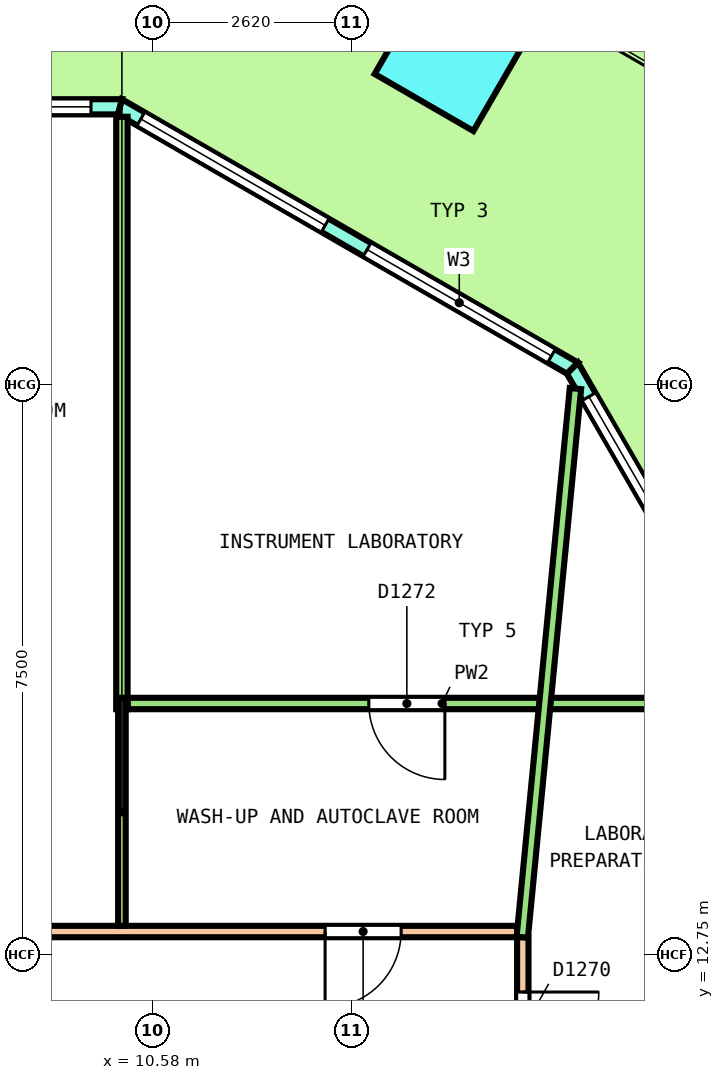
"""IFC4 building model, lengths in metres.
Left out: names, types, materials, properties, quantities, classifications, styles, units other than length and angle.
Written with IfcOpenShell. Run it as: python <this file> out.ifc"""

import sys

from ifc_helpers import new_model, si_unit, direction, frame, frame_2d, origin, origin_2d, place, context, subcontext, project, spatial, polyline, rectangle, outline, extrude, element, fill, save


model = new_model("IFC4")
c1 = context("Model", 3, precision=1e-05, world=origin(), true_north=direction((0.0, 1.0)))
c2 = subcontext(c1, "Body", "Model", "MODEL_VIEW")
j1 = project(units=[si_unit("LENGTHUNIT", "METRE"), si_unit("PLANEANGLEUNIT", "RADIAN")], contexts=[c1])
p1 = place(None, origin())
s1 = spatial("IfcSite", under=j1, at=p1, CompositionType="ELEMENT")
p2 = place(p1, origin())
s2 = spatial("IfcBuilding", under=s1, at=p2, CompositionType="ELEMENT")
p3 = place(p2, frame((0.0, 0.0, 23.4)))
s3 = spatial("IfcBuildingStorey", under=s2, at=p3, CompositionType="ELEMENT", Elevation=23.4)
p4 = place(p3, frame((14.526, 24.606, 0.0), z_axis=(0.036265236264, 0.0, 0.999342199969), x_axis=(-0.865313546461, 0.500246354177, 0.031401456084)))
e1 = element("IfcColumn", 1, at=p4, inside=s3, PredefinedType="COLUMN", context=c2, shape_type="SweptSolid", body=[
    extrude(rectangle(XDim=1.5, YDim=1.5, at=origin_2d()), origin(), (0.0, 0.0, 1.0), 4.053),
])
p5 = place(p3, frame((25.772, 3.714, 0.0), z_axis=(0.0, 0.0, 1.0), x_axis=(-0.500000373815, 0.866025187962, 0.0)))
e2 = element("IfcWall", 2, at=p5, inside=s3, PredefinedType="SOLIDWALL", context=c2, shape_type="SweptSolid", body=[
    extrude(outline(polyline([(-0.027, -0.1), (0.994, -0.1), (2.015, -0.1), (3.035, -0.1), (4.056, -0.1), (5.077, -0.1), (6.097, -0.1), (7.118, -0.1), (8.139, -0.1), (9.16, -0.1), (10.18, -0.1), (11.201, -0.1), (12.222, -0.1), (13.242, -0.1), (14.263, -0.1), (15.284, -0.1), (16.304, -0.1), (17.325, -0.1), (18.346, -0.1), (19.367, -0.1), (19.313, 0.1), (18.298, 0.1), (17.283, 0.1), (16.268, 0.1), (15.253, 0.1), (14.238, 0.1), (13.223, 0.1), (12.208, 0.1), (11.193, 0.1), (10.177, 0.1), (9.162, 0.1), (8.147, 0.1), (7.132, 0.1), (6.117, 0.1), (5.102, 0.1), (4.087, 0.1), (3.072, 0.1), (2.057, 0.1), (1.042, 0.1), (0.027, 0.1), (-0.027, -0.1)])), origin(), (0.0, 0.0, 1.0), 4.1),
])
p6 = place(p5, frame((0.434, 0.0, 0.1)))
e3 = element("IfcOpeningElement", 3, at=p6, cuts=e2, PredefinedType="OPENING", context=c2, shape_type="SweptSolid", body=[
    extrude(rectangle(XDim=3.0, YDim=2.9, at=frame_2d((1.5, 1.45))), frame((0.0, 0.11, 0.0), z_axis=(0.0, -1.0, 0.0), x_axis=(1.0, 0.0, 0.0)), (0.0, 0.0, 1.0), 0.22),
])
p7 = place(p5, frame((4.302, 0.0, 0.1)))
e4 = element("IfcOpeningElement", 4, at=p7, cuts=e2, PredefinedType="OPENING", context=c2, shape_type="SweptSolid", body=[
    extrude(rectangle(XDim=3.0, YDim=2.9, at=frame_2d((1.5, 1.45))), frame((0.0, 0.11, 0.0), z_axis=(0.0, -1.0, 0.0), x_axis=(1.0, 0.0, 0.0)), (0.0, 0.0, 1.0), 0.22),
])
p8 = place(p5, frame((8.77, 0.0, 0.0)))
e5 = element("IfcOpeningElement", 5, at=p8, cuts=e2, PredefinedType="OPENING", context=c2, shape_type="SweptSolid", body=[
    extrude(rectangle(XDim=1.8, YDim=2.4, at=frame_2d((0.9, 1.2))), frame((0.0, 0.11, 0.0), z_axis=(0.0, -1.0, 0.0), x_axis=(1.0, 0.0, 0.0)), (0.0, 0.0, 1.0), 0.22),
])
p9 = place(p5, frame((8.77, 0.0, 2.55)))
e6 = element("IfcOpeningElement", 6, at=p9, cuts=e2, PredefinedType="OPENING", context=c2, shape_type="SweptSolid", body=[
    extrude(rectangle(XDim=1.8, YDim=0.45, at=frame_2d((0.9, 0.225))), frame((0.0, 0.11, 0.0), z_axis=(0.0, -1.0, 0.0), x_axis=(1.0, 0.0, 0.0)), (0.0, 0.0, 1.0), 0.22),
])
p10 = place(p5, frame((12.038, 0.0, 0.1)))
e7 = element("IfcOpeningElement", 7, at=p10, cuts=e2, PredefinedType="OPENING", context=c2, shape_type="SweptSolid", body=[
    extrude(rectangle(XDim=3.0, YDim=2.9, at=frame_2d((1.5, 1.45))), frame((0.0, 0.11, 0.0), z_axis=(0.0, -1.0, 0.0), x_axis=(1.0, 0.0, 0.0)), (0.0, 0.0, 1.0), 0.22),
])
p11 = place(p5, frame((15.906, 0.0, 0.1)))
e8 = element("IfcOpeningElement", 8, at=p11, cuts=e2, PredefinedType="OPENING", context=c2, shape_type="SweptSolid", body=[
    extrude(rectangle(XDim=3.0, YDim=2.9, at=frame_2d((1.5, 1.45))), frame((0.0, 0.11, 0.0), z_axis=(0.0, -1.0, 0.0), x_axis=(1.0, 0.0, 0.0)), (0.0, 0.0, 1.0), 0.22),
])
p12 = place(p3, frame((16.103, 20.463, 0.0), z_axis=(0.0, 0.0, 1.0), x_axis=(-0.866029458321, 0.49999297727, 0.0)))
e9 = element("IfcWall", 9, at=p12, inside=s3, PredefinedType="SOLIDWALL", context=c2, shape_type="SweptSolid", body=[
    extrude(outline(polyline([(-0.027, -0.1), (1.128, -0.1), (2.282, -0.1), (3.437, -0.1), (4.592, -0.1), (5.747, -0.1), (6.901, -0.1), (6.848, 0.1), (5.711, 0.1), (4.574, 0.1), (3.437, 0.1), (2.301, 0.1), (1.164, 0.1), (0.027, 0.1), (-0.027, -0.1)])), origin(), (0.0, 0.0, 1.0), 4.1),
])
p13 = place(p12, frame((0.319, 0.0, 0.1)))
e10 = element("IfcOpeningElement", 10, at=p13, cuts=e9, PredefinedType="OPENING", context=c2, shape_type="SweptSolid", body=[
    extrude(rectangle(XDim=2.8, YDim=2.9, at=frame_2d((1.4, 1.45))), frame((0.0, 0.11, 0.0), z_axis=(0.0, -1.0, 0.0), x_axis=(1.0, 0.0, 0.0)), (0.0, 0.0, 1.0), 0.22),
])
p14 = place(p12, frame((3.756, 0.0, 0.1)))
e11 = element("IfcOpeningElement", 11, at=p14, cuts=e9, PredefinedType="OPENING", context=c2, shape_type="SweptSolid", body=[
    extrude(rectangle(XDim=2.8, YDim=2.9, at=frame_2d((1.4, 1.45))), frame((0.0, 0.11, 0.0), z_axis=(0.0, -1.0, 0.0), x_axis=(1.0, 0.0, 0.0)), (0.0, 0.0, 1.0), 0.22),
])
p15 = place(p3, frame((10.149, 23.9, 0.0), z_axis=(0.0, 0.0, 1.0), x_axis=(-1.0, 0.0, 0.0)))
e12 = element("IfcWall", 12, at=p15, inside=s3, PredefinedType="SOLIDWALL", context=c2, shape_type="SweptSolid", body=[
    extrude(outline(polyline([(-0.027, -0.1), (0.991, -0.1), (2.008, -0.1), (3.026, -0.1), (4.043, -0.1), (5.061, -0.1), (6.079, -0.1), (7.096, -0.1), (8.114, -0.1), (9.131, -0.1), (10.149, -0.1), (11.167, -0.1), (12.184, -0.1), (13.202, -0.1), (14.219, -0.1), (15.237, -0.1), (16.254, -0.1), (17.272, -0.1), (18.29, -0.1), (19.307, -0.1), (20.325, -0.1), (20.271, 0.1), (19.259, 0.1), (18.247, 0.1), (17.234, 0.1), (16.222, 0.1), (15.21, 0.1), (14.198, 0.1), (13.186, 0.1), (12.173, 0.1), (11.161, 0.1), (10.149, 0.1), (9.137, 0.1), (8.125, 0.1), (7.112, 0.1), (6.1, 0.1), (5.088, 0.1), (4.076, 0.1), (3.063, 0.1), (2.051, 0.1), (1.039, 0.1), (0.027, 0.1), (-0.027, -0.1)])), origin(), (0.0, 0.0, 1.0), 4.1),
])
p16 = place(p15, frame((0.38, 0.0, 0.1)))
e13 = element("IfcOpeningElement", 13, at=p16, cuts=e12, PredefinedType="OPENING", context=c2, shape_type="SweptSolid", body=[
    extrude(rectangle(XDim=3.3, YDim=2.9, at=frame_2d((1.65, 1.45))), frame((0.0, 0.11, 0.0), z_axis=(0.0, -1.0, 0.0), x_axis=(1.0, 0.0, 0.0)), (0.0, 0.0, 1.0), 0.22),
])
p17 = place(p15, frame((4.439, 0.0, 0.1)))
e14 = element("IfcOpeningElement", 14, at=p17, cuts=e12, PredefinedType="OPENING", context=c2, shape_type="SweptSolid", body=[
    extrude(rectangle(XDim=3.3, YDim=2.9, at=frame_2d((1.65, 1.45))), frame((0.0, 0.11, 0.0), z_axis=(0.0, -1.0, 0.0), x_axis=(1.0, 0.0, 0.0)), (0.0, 0.0, 1.0), 0.22),
])
p18 = place(p15, frame((9.249, 0.0, 0.0)))
e15 = element("IfcOpeningElement", 15, at=p18, cuts=e12, PredefinedType="OPENING", context=c2, shape_type="SweptSolid", body=[
    extrude(rectangle(XDim=1.8, YDim=2.4, at=frame_2d((0.9, 1.2))), frame((0.0, 0.11, 0.0), z_axis=(0.0, -1.0, 0.0), x_axis=(1.0, 0.0, 0.0)), (0.0, 0.0, 1.0), 0.22),
])
p19 = place(p15, frame((9.249, 0.0, 2.55)))
e16 = element("IfcOpeningElement", 16, at=p19, cuts=e12, PredefinedType="OPENING", context=c2, shape_type="SweptSolid", body=[
    extrude(rectangle(XDim=1.8, YDim=0.45, at=frame_2d((0.9, 0.225))), frame((0.0, 0.11, 0.0), z_axis=(0.0, -1.0, 0.0), x_axis=(1.0, 0.0, 0.0)), (0.0, 0.0, 1.0), 0.22),
])
p20 = place(p15, frame((12.559, 0.0, 0.1)))
e17 = element("IfcOpeningElement", 17, at=p20, cuts=e12, PredefinedType="OPENING", context=c2, shape_type="SweptSolid", body=[
    extrude(rectangle(XDim=3.3, YDim=2.9, at=frame_2d((1.65, 1.45))), frame((0.0, 0.11, 0.0), z_axis=(0.0, -1.0, 0.0), x_axis=(1.0, 0.0, 0.0)), (0.0, 0.0, 1.0), 0.22),
])
p21 = place(p15, frame((16.618, 0.0, 0.1)))
e18 = element("IfcOpeningElement", 18, at=p21, cuts=e12, PredefinedType="OPENING", context=c2, shape_type="SweptSolid", body=[
    extrude(rectangle(XDim=3.3, YDim=2.9, at=frame_2d((1.65, 1.45))), frame((0.0, 0.11, 0.0), z_axis=(0.0, -1.0, 0.0), x_axis=(1.0, 0.0, 0.0)), (0.0, 0.0, 1.0), 0.22),
])
p22 = place(p3, frame((15.45, -12.975, 0.0), z_axis=(0.0, 0.0, 1.0), x_axis=(0.0, 1.0, 0.0)))
e19 = element("IfcWall", 19, at=p22, inside=s3, PredefinedType="PARTITIONING", context=c2, shape_type="SweptSolid", body=[
    extrude(rectangle(XDim=25.95, YDim=0.15, at=frame_2d((12.975, 0.0))), origin(), (0.0, 0.0, 1.0), 3.05),
])
p23 = place(p22, frame((13.124, 0.0, 0.0)))
e20 = element("IfcOpeningElement", 20, at=p23, cuts=e19, PredefinedType="OPENING", context=c2, shape_type="SweptSolid", body=[
    extrude(rectangle(XDim=1.0, YDim=2.1, at=frame_2d((0.5, 1.05))), frame((0.0, 0.085, 0.0), z_axis=(0.0, -1.0, 0.0), x_axis=(1.0, 0.0, 0.0)), (0.0, 0.0, 1.0), 0.17),
])
p24 = place(p22, frame((24.229, 0.0, 0.0)))
e21 = element("IfcOpeningElement", 21, at=p24, cuts=e19, PredefinedType="OPENING", context=c2, shape_type="SweptSolid", body=[
    extrude(rectangle(XDim=1.0, YDim=2.1, at=frame_2d((0.5, 1.05))), frame((0.0, 0.085, 0.0), z_axis=(0.0, -1.0, 0.0), x_axis=(1.0, 0.0, 0.0)), (0.0, 0.0, 1.0), 0.17),
])
p25 = place(p22, frame((3.132, 0.0, 0.0)))
e22 = element("IfcOpeningElement", 22, at=p25, cuts=e19, PredefinedType="OPENING", context=c2, shape_type="SweptSolid", body=[
    extrude(rectangle(XDim=1.0, YDim=2.1, at=frame_2d((0.5, 1.05))), frame((0.0, 0.085, 0.0), z_axis=(0.0, -1.0, 0.0), x_axis=(1.0, 0.0, 0.0)), (0.0, 0.0, 1.0), 0.17),
])
p26 = place(p3, frame((-15.375, 13.05, 0.0), z_axis=(0.0, 0.0, 1.0), x_axis=(1.0, 0.0, 0.0)))
e23 = element("IfcWall", 23, at=p26, inside=s3, PredefinedType="PARTITIONING", context=c2, shape_type="SweptSolid", body=[
    extrude(rectangle(XDim=30.75, YDim=0.15, at=frame_2d((15.375, 0.0))), origin(), (0.0, 0.0, 1.0), 3.05),
])
p27 = place(p26, frame((28.224, 0.0, 0.0)))
e24 = element("IfcOpeningElement", 24, at=p27, cuts=e23, PredefinedType="OPENING", context=c2, shape_type="SweptSolid", body=[
    extrude(rectangle(XDim=1.0, YDim=2.1, at=frame_2d((0.5, 1.05))), frame((0.0, 0.085, 0.0), z_axis=(0.0, -1.0, 0.0), x_axis=(1.0, 0.0, 0.0)), (0.0, 0.0, 1.0), 0.17),
])
p28 = place(p26, frame((23.241, 0.0, 0.0)))
e25 = element("IfcOpeningElement", 25, at=p28, cuts=e23, PredefinedType="OPENING", context=c2, shape_type="SweptSolid", body=[
    extrude(rectangle(XDim=1.2, YDim=2.1, at=frame_2d((0.6, 1.05))), frame((0.0, 0.085, 0.0), z_axis=(0.0, -1.0, 0.0), x_axis=(1.0, 0.0, 0.0)), (0.0, 0.0, 1.0), 0.17),
])
p29 = place(p26, frame((17.746, 0.0, 0.0)))
e26 = element("IfcOpeningElement", 26, at=p29, cuts=e23, PredefinedType="OPENING", context=c2, shape_type="SweptSolid", body=[
    extrude(rectangle(XDim=1.2, YDim=2.1, at=frame_2d((0.6, 1.05))), frame((0.0, 0.085, 0.0), z_axis=(0.0, -1.0, 0.0), x_axis=(1.0, 0.0, 0.0)), (0.0, 0.0, 1.0), 0.17),
])
p30 = place(p26, frame((11.247, 0.0, 0.0)))
e27 = element("IfcOpeningElement", 27, at=p30, cuts=e23, PredefinedType="OPENING", context=c2, shape_type="SweptSolid", body=[
    extrude(rectangle(XDim=1.2, YDim=2.1, at=frame_2d((0.6, 1.05))), frame((0.0, 0.085, 0.0), z_axis=(0.0, -1.0, 0.0), x_axis=(1.0, 0.0, 0.0)), (0.0, 0.0, 1.0), 0.17),
])
p31 = place(p26, frame((6.577, 0.0, 0.0)))
e28 = element("IfcOpeningElement", 28, at=p31, cuts=e23, PredefinedType="OPENING", context=c2, shape_type="SweptSolid", body=[
    extrude(rectangle(XDim=1.0, YDim=2.1, at=frame_2d((0.5, 1.05))), frame((0.0, 0.085, 0.0), z_axis=(0.0, -1.0, 0.0), x_axis=(1.0, 0.0, 0.0)), (0.0, 0.0, 1.0), 0.17),
])
p32 = place(p26, frame((0.562, 0.0, 0.0)))
e29 = element("IfcOpeningElement", 29, at=p32, cuts=e23, PredefinedType="OPENING", context=c2, shape_type="SweptSolid", body=[
    extrude(rectangle(XDim=1.0, YDim=2.1, at=frame_2d((0.5, 1.05))), frame((0.0, 0.085, 0.0), z_axis=(0.0, -1.0, 0.0), x_axis=(1.0, 0.0, 0.0)), (0.0, 0.0, 1.0), 0.17),
])
p33 = place(p3, frame((10.251, 16.05, 0.0), z_axis=(0.0, 0.0, 1.0), x_axis=(1.0, 0.0, 0.0)))
e30 = element("IfcWall", 30, at=p33, inside=s3, PredefinedType="PARTITIONING", context=c2, shape_type="SweptSolid", body=[
    extrude(rectangle(XDim=8.274, YDim=0.15, at=frame_2d((4.137, 0.0))), origin(), (0.0, 0.0, 1.0), 3.05),
])
p34 = place(p33, frame((3.174, 0.0, 0.0)))
e31 = element("IfcOpeningElement", 31, at=p34, cuts=e30, PredefinedType="OPENING", context=c2, shape_type="SweptSolid", body=[
    extrude(rectangle(XDim=1.0, YDim=2.1, at=frame_2d((0.5, 1.05))), frame((0.0, 0.085, 0.0), z_axis=(0.0, -1.0, 0.0), x_axis=(1.0, 0.0, 0.0)), (0.0, 0.0, 1.0), 0.17),
])
p35 = place(p3, frame((15.443, 12.975, 0.0), z_axis=(0.0, 0.0, 1.0), x_axis=(0.096486657892, 0.995334277943, 0.0)))
e32 = element("IfcWall", 32, at=p35, inside=s3, PredefinedType="PARTITIONING", context=c2, shape_type="SweptSolid", body=[
    extrude(rectangle(XDim=7.252, YDim=0.15, at=frame_2d((3.626, 0.0))), origin(), (0.0, 0.0, 1.0), 3.05),
])
p36 = place(p3, frame((10.176, 15.975, 0.0), z_axis=(0.0, 0.0, 1.0), x_axis=(0.0, 1.0, 0.0)))
e33 = element("IfcWall", 33, at=p36, inside=s3, PredefinedType="PARTITIONING", context=c2, shape_type="SweptSolid", body=[
    extrude(rectangle(XDim=7.794, YDim=0.15, at=frame_2d((3.897, 0.0))), origin(), (0.0, 0.0, 1.0), 3.05),
])
p37 = place(p3, frame((10.176, 13.125, 0.0), z_axis=(0.0, 0.0, 1.0), x_axis=(0.0, 1.0, 0.0)))
e34 = element("IfcWall", 34, at=p37, inside=s3, PredefinedType="PARTITIONING", context=c2, shape_type="SweptSolid", body=[
    extrude(rectangle(XDim=3.0, YDim=0.1, at=frame_2d((1.5, 0.0))), origin(), (0.0, 0.0, 1.0), 4.1),
])
p38 = place(p11, origin())
e35 = element("IfcWindow", 35, at=p38, inside=s3, PartitioningType="SINGLE_PANEL", PredefinedType="WINDOW", context=c2, shape_type="SweptSolid", body=[
    extrude(rectangle(XDim=3.0, YDim=2.9, at=frame_2d((1.5, 1.45))), frame((0.0, 0.03, 0.0), z_axis=(0.0, -1.0, 0.0), x_axis=(1.0, 0.0, 0.0)), (0.0, 0.0, 1.0), 0.06),
])
fill(e8, e35)
p39 = place(p13, origin())
e36 = element("IfcWindow", 36, at=p39, inside=s3, PartitioningType="SINGLE_PANEL", PredefinedType="WINDOW", context=c2, shape_type="SweptSolid", body=[
    extrude(rectangle(XDim=2.8, YDim=2.9, at=frame_2d((1.4, 1.45))), frame((0.0, 0.03, 0.0), z_axis=(0.0, -1.0, 0.0), x_axis=(1.0, 0.0, 0.0)), (0.0, 0.0, 1.0), 0.06),
])
fill(e10, e36)
p40 = place(p14, origin())
e37 = element("IfcWindow", 37, at=p40, inside=s3, PartitioningType="SINGLE_PANEL", PredefinedType="WINDOW", context=c2, shape_type="SweptSolid", body=[
    extrude(rectangle(XDim=2.8, YDim=2.9, at=frame_2d((1.4, 1.45))), frame((0.0, 0.03, 0.0), z_axis=(0.0, -1.0, 0.0), x_axis=(1.0, 0.0, 0.0)), (0.0, 0.0, 1.0), 0.06),
])
fill(e11, e37)
p41 = place(p16, origin())
e38 = element("IfcWindow", 38, at=p41, inside=s3, PartitioningType="SINGLE_PANEL", PredefinedType="WINDOW", context=c2, shape_type="SweptSolid", body=[
    extrude(rectangle(XDim=3.3, YDim=2.9, at=frame_2d((1.65, 1.45))), frame((0.0, 0.03, 0.0), z_axis=(0.0, -1.0, 0.0), x_axis=(1.0, 0.0, 0.0)), (0.0, 0.0, 1.0), 0.06),
])
fill(e13, e38)
p42 = place(p24, origin())
e39 = element("IfcDoor", 39, at=p42, inside=s3, OperationType="SINGLE_SWING_LEFT", PredefinedType="DOOR", context=c2, shape_type="SweptSolid", body=[
    extrude(rectangle(XDim=1.0, YDim=2.1, at=frame_2d((0.5, 1.05))), frame((0.0, 0.025, 0.0), z_axis=(0.0, -1.0, 0.0), x_axis=(1.0, 0.0, 0.0)), (0.0, 0.0, 1.0), 0.05),
])
fill(e21, e39)
p43 = place(p27, origin())
e40 = element("IfcDoor", 40, at=p43, inside=s3, OperationType="SINGLE_SWING_RIGHT", PredefinedType="DOOR", context=c2, shape_type="SweptSolid", body=[
    extrude(rectangle(XDim=1.0, YDim=2.1, at=frame_2d((0.5, 1.05))), frame((0.0, 0.025, 0.0), z_axis=(0.0, -1.0, 0.0), x_axis=(1.0, 0.0, 0.0)), (0.0, 0.0, 1.0), 0.05),
])
fill(e24, e40)
p44 = place(p34, origin())
e41 = element("IfcDoor", 41, at=p44, inside=s3, OperationType="SINGLE_SWING_RIGHT", PredefinedType="DOOR", context=c2, shape_type="SweptSolid", body=[
    extrude(rectangle(XDim=1.0, YDim=2.1, at=frame_2d((0.5, 1.05))), frame((0.0, 0.025, 0.0), z_axis=(0.0, -1.0, 0.0), x_axis=(1.0, 0.0, 0.0)), (0.0, 0.0, 1.0), 0.05),
])
fill(e31, e41)
save(model, sys.argv[1])
